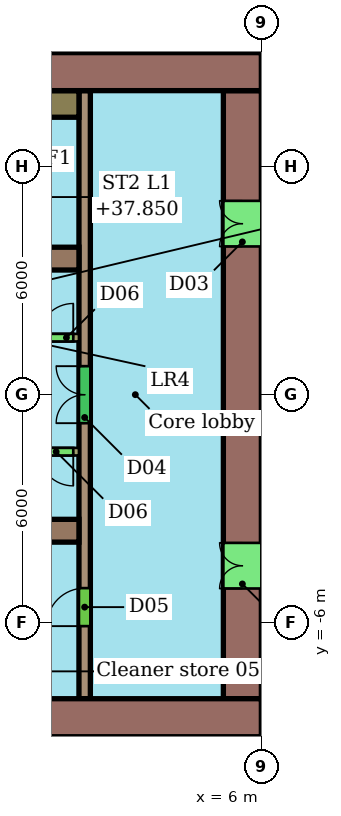
"""IFC4 building model, lengths in metres.
Left out: names, types, materials, properties, quantities, classifications, styles, units other than length and angle.
Written with IfcOpenShell. Run it as: python <this file> out.ifc"""

import sys

from ifc_helpers import new_model, si_unit, direction, frame, frame_2d, origin, place, context, subcontext, project, spatial, rectangle, extrude, element, fill, save


model = new_model("IFC4")
c1 = context("Model", 3, precision=1e-05, world=origin(), true_north=direction((0.0, 1.0)))
c2 = subcontext(c1, "Body", "Model", "MODEL_VIEW")
j1 = project(units=[si_unit("LENGTHUNIT", "METRE"), si_unit("PLANEANGLEUNIT", "RADIAN")], contexts=[c1])
p1 = place(None, origin())
s1 = spatial("IfcSite", under=j1, at=p1, CompositionType="ELEMENT")
p2 = place(p1, origin())
s2 = spatial("IfcBuilding", under=s1, at=p2, CompositionType="ELEMENT")
p3 = place(p2, frame((0.0, 0.0, 36.0)))
s3 = spatial("IfcBuildingStorey", under=s2, at=p3, CompositionType="ELEMENT", Elevation=36.0)
p4 = place(p3, frame((6.0, 8.5, 0.0), z_axis=(0.0, 0.0, 1.0), x_axis=(-1.0, 0.0, 0.0)))
e1 = element("IfcWall", 1, at=p4, inside=s3, PredefinedType="SHEAR", context=c2, shape_type="SweptSolid", body=[
    extrude(rectangle(XDim=12.0, YDim=1.0, at=frame_2d((6.0, 0.0))), origin(), (0.0, 0.0, 1.0), 3.4),
])
p5 = place(p4, frame((5.6, 0.0, 0.0)))
e2 = element("IfcOpeningElement", 2, at=p5, cuts=e1, PredefinedType="OPENING", context=c2, shape_type="SweptSolid", body=[
    extrude(rectangle(XDim=1.2, YDim=2.1, at=frame_2d((0.6, 1.05))), frame((0.0, 0.51, 0.0), z_axis=(0.0, -1.0, 0.0), x_axis=(1.0, 0.0, 0.0)), (0.0, 0.0, 1.0), 1.02),
])
p6 = place(p3, frame((-18.0, -8.5, 0.0), z_axis=(0.0, 0.0, 1.0), x_axis=(1.0, 0.0, 0.0)))
e3 = element("IfcWall", 3, at=p6, inside=s3, PredefinedType="SHEAR", context=c2, shape_type="SweptSolid", body=[
    extrude(rectangle(XDim=24.0, YDim=1.0, at=frame_2d((12.0, 0.0))), origin(), (0.0, 0.0, 1.0), 3.4),
])
p7 = place(p6, frame((6.0, 0.0, 0.0)))
e4 = element("IfcOpeningElement", 4, at=p7, cuts=e3, PredefinedType="OPENING", context=c2, shape_type="SweptSolid", body=[
    extrude(rectangle(XDim=1.2, YDim=2.1, at=frame_2d((0.6, 1.05))), frame((0.0, 0.51, 0.0), z_axis=(0.0, -1.0, 0.0), x_axis=(1.0, 0.0, 0.0)), (0.0, 0.0, 1.0), 1.02),
])
p8 = place(p3, frame((5.5, -8.0, 0.0), z_axis=(0.0, 0.0, 1.0), x_axis=(0.0, 1.0, 0.0)))
e5 = element("IfcWall", 5, at=p8, inside=s3, PredefinedType="SHEAR", context=c2, shape_type="SweptSolid", body=[
    extrude(rectangle(XDim=16.0, YDim=1.0, at=frame_2d((8.0, 0.0))), origin(), (0.0, 0.0, 1.0), 3.4),
])
p9 = place(p8, frame((2.9, 0.0, 0.0)))
e6 = element("IfcOpeningElement", 6, at=p9, cuts=e5, PredefinedType="OPENING", context=c2, shape_type="SweptSolid", body=[
    extrude(rectangle(XDim=1.2, YDim=2.1, at=frame_2d((0.6, 1.05))), frame((0.0, 0.51, 0.0), z_axis=(0.0, -1.0, 0.0), x_axis=(1.0, 0.0, 0.0)), (0.0, 0.0, 1.0), 1.02),
])
p10 = place(p8, frame((11.9, 0.0, 0.0)))
e7 = element("IfcOpeningElement", 7, at=p10, cuts=e5, PredefinedType="OPENING", context=c2, shape_type="SweptSolid", body=[
    extrude(rectangle(XDim=1.2, YDim=2.1, at=frame_2d((0.6, 1.05))), frame((0.0, 0.51, 0.0), z_axis=(0.0, -1.0, 0.0), x_axis=(1.0, 0.0, 0.0)), (0.0, 0.0, 1.0), 1.02),
])
for number, where, z_axis, x_axis in (
    (8, (-6.0, 3.58, 0.0), (0.0, 0.0, 1.0), (1.0, 0.0, 0.0)),
    (9, (-6.0, -3.58, 0.0), (0.0, 0.0, 1.0), (1.0, 0.0, 0.0)),
):
    element("IfcWall", number, at=place(p3, frame(where, z_axis=z_axis, x_axis=x_axis)), inside=s3, PredefinedType="SHEAR", context=c2, shape_type="SweptSolid", body=[
        extrude(rectangle(XDim=7.2, YDim=0.6, at=frame_2d((3.6, 0.0))), origin(), (0.0, 0.0, 1.0), 3.4),
    ])
p11 = place(p3, frame((1.35, -8.0, 0.0), z_axis=(0.0, 0.0, 1.0), x_axis=(0.0, 1.0, 0.0)))
e10 = element("IfcWall", 10, at=p11, inside=s3, PredefinedType="SHEAR", context=c2, shape_type="SweptSolid", body=[
    extrude(rectangle(XDim=16.0, YDim=0.3, at=frame_2d((8.0, 0.0))), origin(), (0.0, 0.0, 1.0), 3.4),
])
p12 = place(p11, frame((1.91, 0.0, 0.0)))
e11 = element("IfcOpeningElement", 11, at=p12, cuts=e10, PredefinedType="OPENING", context=c2, shape_type="SweptSolid", body=[
    extrude(rectangle(XDim=1.0, YDim=2.1, at=frame_2d((0.5, 1.05))), frame((0.0, 0.16, 0.0), z_axis=(0.0, -1.0, 0.0), x_axis=(1.0, 0.0, 0.0)), (0.0, 0.0, 1.0), 0.32),
])
p13 = place(p11, frame((7.25, 0.0, 0.0)))
e12 = element("IfcOpeningElement", 12, at=p13, cuts=e10, PredefinedType="OPENING", context=c2, shape_type="SweptSolid", body=[
    extrude(rectangle(XDim=1.5, YDim=2.1, at=frame_2d((0.75, 1.05))), frame((0.0, 0.16, 0.0), z_axis=(0.0, -1.0, 0.0), x_axis=(1.0, 0.0, 0.0)), (0.0, 0.0, 1.0), 0.32),
])
p14 = place(p3, frame((-13.2, 1.5, 0.0), z_axis=(0.0, 0.0, 1.0), x_axis=(1.0, 0.0, 0.0)))
e13 = element("IfcWall", 13, at=p14, inside=s3, PredefinedType="SHEAR", context=c2, shape_type="SweptSolid", body=[
    extrude(rectangle(XDim=14.4, YDim=0.2, at=frame_2d((7.2, 0.0))), origin(), (0.0, 0.0, 1.0), 3.4),
])
p15 = place(p14, frame((0.546, 0.0, 0.0)))
e14 = element("IfcOpeningElement", 14, at=p15, cuts=e13, PredefinedType="OPENING", context=c2, shape_type="SweptSolid", body=[
    extrude(rectangle(XDim=1.1, YDim=2.1, at=frame_2d((0.55, 1.05))), frame((0.0, 0.11, 0.0), z_axis=(0.0, -1.0, 0.0), x_axis=(1.0, 0.0, 0.0)), (0.0, 0.0, 1.0), 0.22),
])
p16 = place(p14, frame((2.988, 0.0, 0.0)))
e15 = element("IfcOpeningElement", 15, at=p16, cuts=e13, PredefinedType="OPENING", context=c2, shape_type="SweptSolid", body=[
    extrude(rectangle(XDim=1.1, YDim=2.1, at=frame_2d((0.55, 1.05))), frame((0.0, 0.11, 0.0), z_axis=(0.0, -1.0, 0.0), x_axis=(1.0, 0.0, 0.0)), (0.0, 0.0, 1.0), 0.22),
])
p17 = place(p14, frame((5.429, 0.0, 0.0)))
e16 = element("IfcOpeningElement", 16, at=p17, cuts=e13, PredefinedType="OPENING", context=c2, shape_type="SweptSolid", body=[
    extrude(rectangle(XDim=1.1, YDim=2.1, at=frame_2d((0.55, 1.05))), frame((0.0, 0.11, 0.0), z_axis=(0.0, -1.0, 0.0), x_axis=(1.0, 0.0, 0.0)), (0.0, 0.0, 1.0), 0.22),
])
p18 = place(p14, frame((7.871, 0.0, 0.0)))
e17 = element("IfcOpeningElement", 17, at=p18, cuts=e13, PredefinedType="OPENING", context=c2, shape_type="SweptSolid", body=[
    extrude(rectangle(XDim=1.1, YDim=2.1, at=frame_2d((0.55, 1.05))), frame((0.0, 0.11, 0.0), z_axis=(0.0, -1.0, 0.0), x_axis=(1.0, 0.0, 0.0)), (0.0, 0.0, 1.0), 0.22),
])
p19 = place(p14, frame((10.21, 0.0, 0.0)))
e18 = element("IfcOpeningElement", 18, at=p19, cuts=e13, PredefinedType="OPENING", context=c2, shape_type="SweptSolid", body=[
    extrude(rectangle(XDim=1.0, YDim=2.1, at=frame_2d((0.5, 1.05))), frame((0.0, 0.11, 0.0), z_axis=(0.0, -1.0, 0.0), x_axis=(1.0, 0.0, 0.0)), (0.0, 0.0, 1.0), 0.22),
])
p20 = place(p14, frame((13.35, 0.0, 0.0)))
e19 = element("IfcOpeningElement", 19, at=p20, cuts=e13, PredefinedType="OPENING", context=c2, shape_type="SweptSolid", body=[
    extrude(rectangle(XDim=0.9, YDim=2.1, at=frame_2d((0.45, 1.05))), frame((0.0, 0.11, 0.0), z_axis=(0.0, -1.0, 0.0), x_axis=(1.0, 0.0, 0.0)), (0.0, 0.0, 1.0), 0.22),
])
p21 = place(p3, frame((1.2, -1.5, 0.0), z_axis=(0.0, 0.0, 1.0), x_axis=(-1.0, 0.0, 0.0)))
e20 = element("IfcWall", 20, at=p21, inside=s3, PredefinedType="SHEAR", context=c2, shape_type="SweptSolid", body=[
    extrude(rectangle(XDim=14.4, YDim=0.2, at=frame_2d((7.2, 0.0))), origin(), (0.0, 0.0, 1.0), 3.4),
])
p22 = place(p21, frame((7.821, 0.0, 0.0)))
e21 = element("IfcOpeningElement", 21, at=p22, cuts=e20, PredefinedType="OPENING", context=c2, shape_type="SweptSolid", body=[
    extrude(rectangle(XDim=1.2, YDim=2.1, at=frame_2d((0.6, 1.05))), frame((0.0, 0.11, 0.0), z_axis=(0.0, -1.0, 0.0), x_axis=(1.0, 0.0, 0.0)), (0.0, 0.0, 1.0), 0.22),
])
p23 = place(p21, frame((0.15, 0.0, 0.0)))
e22 = element("IfcOpeningElement", 22, at=p23, cuts=e20, PredefinedType="OPENING", context=c2, shape_type="SweptSolid", body=[
    extrude(rectangle(XDim=0.9, YDim=2.1, at=frame_2d((0.45, 1.05))), frame((0.0, 0.11, 0.0), z_axis=(0.0, -1.0, 0.0), x_axis=(1.0, 0.0, 0.0)), (0.0, 0.0, 1.0), 0.22),
])
p24 = place(p3, frame((0.4, 7.65, 0.0), z_axis=(0.0, 0.0, 1.0), x_axis=(1.0, 0.0, 0.0)))
e23 = element("IfcWall", 23, at=p24, inside=s3, PredefinedType="SHEAR", context=c2, shape_type="SweptSolid", body=[
    extrude(rectangle(XDim=0.8, YDim=0.7, at=frame_2d((0.4, 0.0))), origin(), (0.0, 0.0, 1.0), 3.4),
])
p25 = place(p9, origin())
e24 = element("IfcDoor", 24, at=p25, inside=s3, OperationType="DOUBLE_DOOR_SINGLE_SWING", PredefinedType="NOTDEFINED", context=c2, shape_type="SweptSolid", body=[
    extrude(rectangle(XDim=1.2, YDim=2.1, at=frame_2d((0.6, 1.05))), frame((0.0, 0.025, 0.0), z_axis=(0.0, -1.0, 0.0), x_axis=(1.0, 0.0, 0.0)), (0.0, 0.0, 1.0), 0.05),
])
fill(e6, e24)
p26 = place(p10, origin())
e25 = element("IfcDoor", 25, at=p26, inside=s3, OperationType="DOUBLE_DOOR_SINGLE_SWING", PredefinedType="NOTDEFINED", context=c2, shape_type="SweptSolid", body=[
    extrude(rectangle(XDim=1.2, YDim=2.1, at=frame_2d((0.6, 1.05))), frame((0.0, 0.025, 0.0), z_axis=(0.0, -1.0, 0.0), x_axis=(1.0, 0.0, 0.0)), (0.0, 0.0, 1.0), 0.05),
])
fill(e7, e25)
p27 = place(p12, origin())
e26 = element("IfcDoor", 26, at=p27, inside=s3, OperationType="SINGLE_SWING_LEFT", PredefinedType="NOTDEFINED", context=c2, shape_type="SweptSolid", body=[
    extrude(rectangle(XDim=1.0, YDim=2.1, at=frame_2d((0.5, 1.05))), frame((0.0, 0.025, 0.0), z_axis=(0.0, -1.0, 0.0), x_axis=(1.0, 0.0, 0.0)), (0.0, 0.0, 1.0), 0.05),
])
fill(e11, e26)
p28 = place(p13, origin())
e27 = element("IfcDoor", 27, at=p28, inside=s3, OperationType="DOUBLE_DOOR_SINGLE_SWING", PredefinedType="NOTDEFINED", context=c2, shape_type="SweptSolid", body=[
    extrude(rectangle(XDim=1.5, YDim=2.1, at=frame_2d((0.75, 1.05))), frame((0.0, 0.025, 0.0), z_axis=(0.0, -1.0, 0.0), x_axis=(1.0, 0.0, 0.0)), (0.0, 0.0, 1.0), 0.05),
])
fill(e12, e27)
p29 = place(p20, origin())
e28 = element("IfcDoor", 28, at=p29, inside=s3, OperationType="SINGLE_SWING_RIGHT", PredefinedType="NOTDEFINED", context=c2, shape_type="SweptSolid", body=[
    extrude(rectangle(XDim=0.9, YDim=2.1, at=frame_2d((0.45, 1.05))), frame((0.0, 0.025, 0.0), z_axis=(0.0, -1.0, 0.0), x_axis=(1.0, 0.0, 0.0)), (0.0, 0.0, 1.0), 0.05),
])
fill(e19, e28)
p30 = place(p23, origin())
e29 = element("IfcDoor", 29, at=p30, inside=s3, OperationType="SINGLE_SWING_LEFT", PredefinedType="NOTDEFINED", context=c2, shape_type="SweptSolid", body=[
    extrude(rectangle(XDim=0.9, YDim=2.1, at=frame_2d((0.45, 1.05))), frame((0.0, 0.025, 0.0), z_axis=(0.0, -1.0, 0.0), x_axis=(1.0, 0.0, 0.0)), (0.0, 0.0, 1.0), 0.05),
])
fill(e22, e29)
save(model, sys.argv[1])
